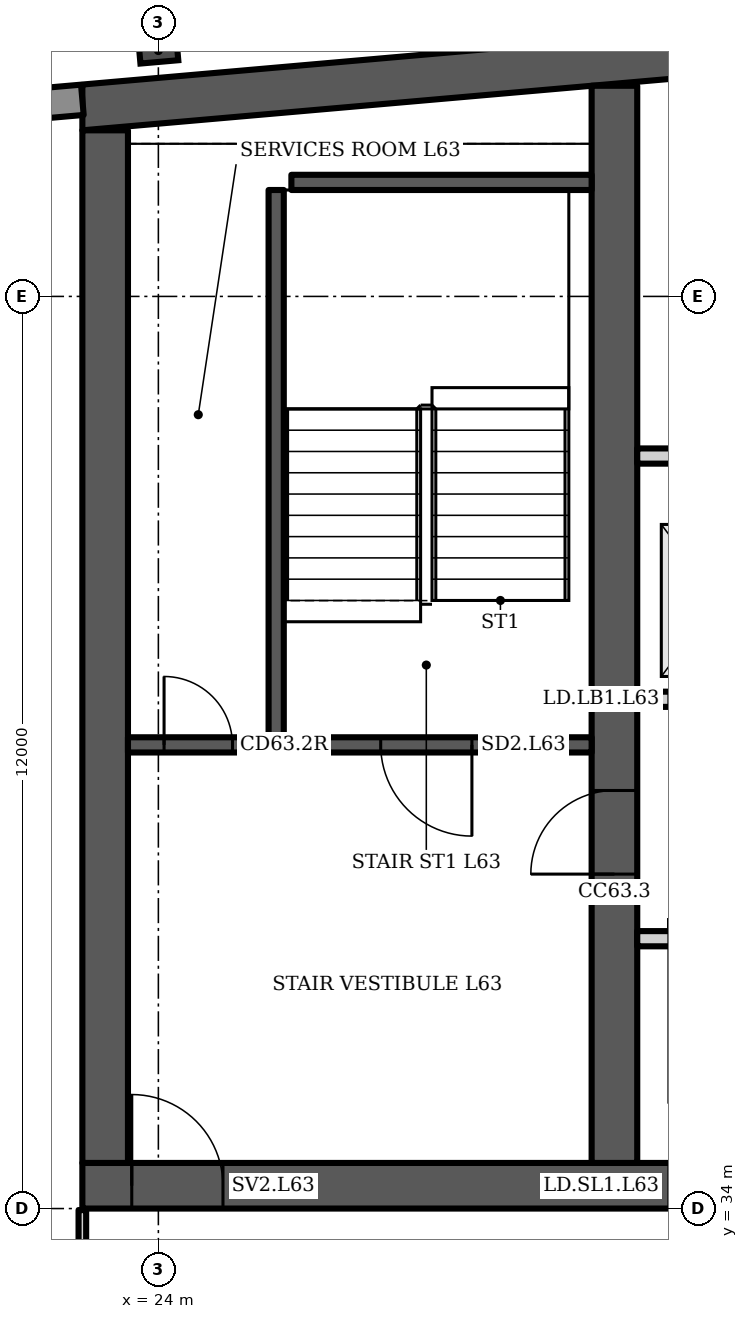
"""IFC4 building model, lengths in metres.
Left out: names, types, materials, properties, quantities, classifications, styles, units other than length and angle.
Written with IfcOpenShell. Run it as: python <this file> out.ifc"""

import sys

from ifc_helpers import new_model, si_unit, direction, frame, frame_2d, origin, origin_2d, place, context, subcontext, project, spatial, polyline, rectangle, i_section, outline, extrude, element, fill, save


model = new_model("IFC4")
c1 = context("Model", 3, precision=1e-05, world=origin(), true_north=direction((0.0, 1.0)))
c2 = subcontext(c1, "Body", "Model", "MODEL_VIEW")
j1 = project(units=[si_unit("LENGTHUNIT", "METRE"), si_unit("PLANEANGLEUNIT", "RADIAN")], contexts=[c1])
p1 = place(None, origin())
s1 = spatial("IfcSite", under=j1, at=p1, CompositionType="ELEMENT")
p2 = place(p1, origin())
s2 = spatial("IfcBuilding", under=s1, at=p2, CompositionType="ELEMENT")
p3 = place(p2, frame((0.0, 0.0, 250.3)))
s3 = spatial("IfcBuildingStorey", under=s2, at=p3, CompositionType="ELEMENT", Elevation=250.3)
p4 = place(p3, frame((0.0, 0.0, -0.0)))
e1 = element("IfcWall", 1, at=p4, inside=s3, PredefinedType="SHEAR", context=c2, shape_type="SweptSolid", body=[
    extrude(outline(polyline([(23.0, 48.185), (40.5, 49.716), (58.0, 48.185), (58.0, 48.787), (40.5, 50.318), (23.0, 48.787), (23.0, 48.185)])), origin(), (0.0, 0.0, 1.0), 3.6),
])
p5 = place(p3, frame((23.0, 34.3, 0.0), z_axis=(0.0, 0.0, 1.0), x_axis=(1.0, 0.0, 0.0)))
e2 = element("IfcWall", 2, at=p5, inside=s3, PredefinedType="SHEAR", context=c2, shape_type="SweptSolid", body=[
    extrude(rectangle(XDim=35.0, YDim=0.6, at=frame_2d((17.5, 0.0))), origin(), (0.0, 0.0, 1.0), 3.6),
])
p6 = place(p5, frame((0.65, 0.0, 0.0)))
e3 = element("IfcOpeningElement", 3, at=p6, cuts=e2, PredefinedType="OPENING", context=c2, shape_type="SweptSolid", body=[
    extrude(rectangle(XDim=1.2, YDim=2.1, at=frame_2d((0.6, 1.05))), frame((0.0, 0.31, 0.0), z_axis=(0.0, -1.0, 0.0), x_axis=(1.0, 0.0, 0.0)), (0.0, 0.0, 1.0), 0.62),
])
p7 = place(p5, frame((7.717, 0.0, 0.0)))
e4 = element("IfcOpeningElement", 4, at=p7, cuts=e2, PredefinedType="OPENING", context=c2, shape_type="SweptSolid", body=[
    extrude(rectangle(XDim=1.1, YDim=2.1, at=frame_2d((0.55, 1.05))), frame((0.0, 0.31, 0.0), z_axis=(0.0, -1.0, 0.0), x_axis=(1.0, 0.0, 0.0)), (0.0, 0.0, 1.0), 0.62),
])
p8 = place(p5, frame((12.183, 0.0, 0.0)))
e5 = element("IfcOpeningElement", 5, at=p8, cuts=e2, PredefinedType="OPENING", context=c2, shape_type="SweptSolid", body=[
    extrude(rectangle(XDim=1.1, YDim=2.1, at=frame_2d((0.55, 1.05))), frame((0.0, 0.31, 0.0), z_axis=(0.0, -1.0, 0.0), x_axis=(1.0, 0.0, 0.0)), (0.0, 0.0, 1.0), 0.62),
])
p9 = place(p5, frame((9.8, 0.0, 0.0)))
e6 = element("IfcOpeningElement", 6, at=p9, cuts=e2, PredefinedType="OPENING", context=c2, shape_type="SweptSolid", body=[
    extrude(rectangle(XDim=1.4, YDim=2.1, at=frame_2d((0.7, 1.05))), frame((0.0, 0.31, 0.0), z_axis=(0.0, -1.0, 0.0), x_axis=(1.0, 0.0, 0.0)), (0.0, 0.0, 1.0), 0.62),
])
p10 = place(p5, frame((14.717, 0.0, 0.0)))
e7 = element("IfcOpeningElement", 7, at=p10, cuts=e2, PredefinedType="OPENING", context=c2, shape_type="SweptSolid", body=[
    extrude(rectangle(XDim=1.1, YDim=2.1, at=frame_2d((0.55, 1.05))), frame((0.0, 0.31, 0.0), z_axis=(0.0, -1.0, 0.0), x_axis=(1.0, 0.0, 0.0)), (0.0, 0.0, 1.0), 0.62),
])
p11 = place(p5, frame((16.95, 0.0, 0.0)))
e8 = element("IfcOpeningElement", 8, at=p11, cuts=e2, PredefinedType="OPENING", context=c2, shape_type="SweptSolid", body=[
    extrude(rectangle(XDim=1.1, YDim=2.1, at=frame_2d((0.55, 1.05))), frame((0.0, 0.31, 0.0), z_axis=(0.0, -1.0, 0.0), x_axis=(1.0, 0.0, 0.0)), (0.0, 0.0, 1.0), 0.62),
])
p12 = place(p5, frame((19.183, 0.0, 0.0)))
e9 = element("IfcOpeningElement", 9, at=p12, cuts=e2, PredefinedType="OPENING", context=c2, shape_type="SweptSolid", body=[
    extrude(rectangle(XDim=1.1, YDim=2.1, at=frame_2d((0.55, 1.05))), frame((0.0, 0.31, 0.0), z_axis=(0.0, -1.0, 0.0), x_axis=(1.0, 0.0, 0.0)), (0.0, 0.0, 1.0), 0.62),
])
p13 = place(p5, frame((26.15, 0.0, 0.0)))
e10 = element("IfcOpeningElement", 10, at=p13, cuts=e2, PredefinedType="OPENING", context=c2, shape_type="SweptSolid", body=[
    extrude(rectangle(XDim=1.2, YDim=2.1, at=frame_2d((0.6, 1.05))), frame((0.0, 0.31, 0.0), z_axis=(0.0, -1.0, 0.0), x_axis=(1.0, 0.0, 0.0)), (0.0, 0.0, 1.0), 0.62),
])
p14 = place(p5, frame((28.767, 0.0, 0.0)))
e11 = element("IfcOpeningElement", 11, at=p14, cuts=e2, PredefinedType="OPENING", context=c2, shape_type="SweptSolid", body=[
    extrude(rectangle(XDim=1.0, YDim=2.1, at=frame_2d((0.5, 1.05))), frame((0.0, 0.31, 0.0), z_axis=(0.0, -1.0, 0.0), x_axis=(1.0, 0.0, 0.0)), (0.0, 0.0, 1.0), 0.62),
])
p15 = place(p5, frame((33.083, 0.0, 0.0)))
e12 = element("IfcOpeningElement", 12, at=p15, cuts=e2, PredefinedType="OPENING", context=c2, shape_type="SweptSolid", body=[
    extrude(rectangle(XDim=1.0, YDim=2.1, at=frame_2d((0.5, 1.05))), frame((0.0, 0.31, 0.0), z_axis=(0.0, -1.0, 0.0), x_axis=(1.0, 0.0, 0.0)), (0.0, 0.0, 1.0), 0.62),
])
p16 = place(p5, frame((30.8, 0.0, 0.0)))
e13 = element("IfcOpeningElement", 13, at=p16, cuts=e2, PredefinedType="OPENING", context=c2, shape_type="SweptSolid", body=[
    extrude(rectangle(XDim=1.4, YDim=2.1, at=frame_2d((0.7, 1.05))), frame((0.0, 0.31, 0.0), z_axis=(0.0, -1.0, 0.0), x_axis=(1.0, 0.0, 0.0)), (0.0, 0.0, 1.0), 0.62),
])
p17 = place(p3, frame((23.3, 34.6, 0.0), z_axis=(0.0, 0.0, 1.0), x_axis=(0.0, 1.0, 0.0)))
e14 = element("IfcWall", 14, at=p17, inside=s3, PredefinedType="SHEAR", context=c2, shape_type="SweptSolid", body=[
    extrude(rectangle(XDim=13.585, YDim=0.6, at=frame_2d((6.792, 0.0))), origin(), (0.0, 0.0, 1.0), 3.6),
])
p18 = place(p3, frame((30.0, 34.6, 0.0), z_axis=(0.0, 0.0, 1.0), x_axis=(0.0, 1.0, 0.0)))
e15 = element("IfcWall", 15, at=p18, inside=s3, PredefinedType="SHEAR", context=c2, shape_type="SweptSolid", body=[
    extrude(rectangle(XDim=14.171, YDim=0.6, at=frame_2d((7.085, 0.0))), origin(), (0.0, 0.0, 1.0), 3.6),
])
p19 = place(p18, frame((3.8, 0.0, 0.0)))
e16 = element("IfcOpeningElement", 16, at=p19, cuts=e15, PredefinedType="OPENING", context=c2, shape_type="SweptSolid", body=[
    extrude(rectangle(XDim=1.1, YDim=2.1, at=frame_2d((0.55, 1.05))), frame((0.0, 0.31, 0.0), z_axis=(0.0, -1.0, 0.0), x_axis=(1.0, 0.0, 0.0)), (0.0, 0.0, 1.0), 0.62),
])
p20 = place(p3, frame((24.0, 49.235, 0.0), z_axis=(0.0, 0.0, 1.0), x_axis=(-0.087156, 0.996197, 0.0)))
e17 = element("IfcColumn", 17, at=p20, inside=s3, PredefinedType="COLUMN", context=c2, shape_type="SweptSolid", body=[
    extrude(i_section(OverallWidth=0.3, OverallDepth=0.5, WebThickness=0.014, FlangeThickness=0.028, FilletRadius=0.027, at=origin_2d()), origin(), (0.0, 0.0, 1.0), 3.6),
])
p21 = place(p3, frame((23.0, 48.587, 0.0), z_axis=(0.0, 0.0, 1.0), x_axis=(-0.996194, -0.087168, 0.0)))
e18 = element("IfcWall", 18, at=p21, inside=s3, PredefinedType="SOLIDWALL", context=c2, shape_type="SweptSolid", body=[
    extrude(rectangle(XDim=2.994, YDim=0.4, at=frame_2d((1.497, 0.0))), origin(), (0.0, 0.0, 1.0), 3.2),
])
p22 = place(p3, frame((23.6, 40.1, 0.0), z_axis=(0.0, 0.0, 1.0), x_axis=(1.0, 0.0, 0.0)))
e19 = element("IfcWall", 19, at=p22, inside=s3, PredefinedType="SHEAR", context=c2, shape_type="SweptSolid", body=[
    extrude(rectangle(XDim=6.1, YDim=0.2, at=frame_2d((3.05, 0.0))), origin(), (0.0, 0.0, 1.0), 3.2),
])
p23 = place(p22, frame((3.325, 0.0, 0.0)))
e20 = element("IfcOpeningElement", 20, at=p23, cuts=e19, PredefinedType="OPENING", context=c2, shape_type="SweptSolid", body=[
    extrude(rectangle(XDim=1.2, YDim=2.1, at=frame_2d((0.6, 1.05))), frame((0.0, 0.11, 0.0), z_axis=(0.0, -1.0, 0.0), x_axis=(1.0, 0.0, 0.0)), (0.0, 0.0, 1.0), 0.22),
])
p24 = place(p22, frame((0.475, 0.0, 0.0)))
e21 = element("IfcOpeningElement", 21, at=p24, cuts=e19, PredefinedType="OPENING", context=c2, shape_type="SweptSolid", body=[
    extrude(rectangle(XDim=0.9, YDim=2.1, at=frame_2d((0.45, 1.05))), frame((0.0, 0.11, 0.0), z_axis=(0.0, -1.0, 0.0), x_axis=(1.0, 0.0, 0.0)), (0.0, 0.0, 1.0), 0.22),
])
p25 = place(p3, frame((25.55, 40.2, 0.0), z_axis=(0.0, 0.0, 1.0), x_axis=(0.0, 1.0, 0.0)))
e22 = element("IfcWall", 22, at=p25, inside=s3, PredefinedType="SHEAR", context=c2, shape_type="SweptSolid", body=[
    extrude(rectangle(XDim=7.2, YDim=0.2, at=frame_2d((3.6, 0.0))), origin(), (0.0, 0.0, 1.0), 3.2),
])
p26 = place(p3, frame((25.75, 47.5, 0.0), z_axis=(0.0, 0.0, 1.0), x_axis=(1.0, 0.0, 0.0)))
e23 = element("IfcWall", 23, at=p26, inside=s3, PredefinedType="SHEAR", context=c2, shape_type="SweptSolid", body=[
    extrude(rectangle(XDim=3.95, YDim=0.2, at=frame_2d((1.975, 0.0))), origin(), (0.0, 0.0, 1.0), 3.2),
])
p27 = place(p3, frame((30.3, 40.7, 0.0), z_axis=(0.0, 0.0, 1.0), x_axis=(1.0, 0.0, 0.0)))
e24 = element("IfcWall", 24, at=p27, inside=s3, PredefinedType="PARTITIONING", context=c2, shape_type="SweptSolid", body=[
    extrude(rectangle(XDim=6.4, YDim=0.2, at=frame_2d((3.2, 0.0))), origin(), (0.0, 0.0, 1.0), 3.2),
])
p28 = place(p27, frame((0.417, 0.0, 0.0)))
e25 = element("IfcOpeningElement", 25, at=p28, cuts=e24, PredefinedType="OPENING", context=c2, shape_type="SweptSolid", body=[
    extrude(rectangle(XDim=1.1, YDim=2.1, at=frame_2d((0.55, 1.05))), frame((0.0, 0.11, 0.0), z_axis=(0.0, -1.0, 0.0), x_axis=(1.0, 0.0, 0.0)), (0.0, 0.0, 1.0), 0.22),
])
p29 = place(p27, frame((2.65, 0.0, 0.0)))
e26 = element("IfcOpeningElement", 26, at=p29, cuts=e24, PredefinedType="OPENING", context=c2, shape_type="SweptSolid", body=[
    extrude(rectangle(XDim=1.1, YDim=2.1, at=frame_2d((0.55, 1.05))), frame((0.0, 0.11, 0.0), z_axis=(0.0, -1.0, 0.0), x_axis=(1.0, 0.0, 0.0)), (0.0, 0.0, 1.0), 0.22),
])
p30 = place(p27, frame((4.883, 0.0, 0.0)))
e27 = element("IfcOpeningElement", 27, at=p30, cuts=e24, PredefinedType="OPENING", context=c2, shape_type="SweptSolid", body=[
    extrude(rectangle(XDim=1.1, YDim=2.1, at=frame_2d((0.55, 1.05))), frame((0.0, 0.11, 0.0), z_axis=(0.0, -1.0, 0.0), x_axis=(1.0, 0.0, 0.0)), (0.0, 0.0, 1.0), 0.22),
])
p31 = place(p3, frame((0.0, 0.0, -0.0)))
e28 = element("IfcWall", 28, at=p31, inside=s3, PredefinedType="PARTITIONING", context=c2, shape_type="SweptSolid", body=[
    extrude(outline(polyline([(32.233, 37.45), (30.3, 37.45), (30.3, 37.65), (32.233, 37.65), (32.433, 37.65), (32.433, 34.6), (32.233, 34.6), (32.233, 37.45)])), origin(), (0.0, 0.0, 1.0), 3.2),
])
p32 = place(p3, frame((0.0, 0.0, -0.0)))
e29 = element("IfcWall", 29, at=p32, inside=s3, PredefinedType="PARTITIONING", context=c2, shape_type="SweptSolid", body=[
    extrude(outline(polyline([(32.433, 40.8), (32.233, 40.8), (32.233, 43.8), (30.3, 43.8), (30.3, 44.0), (36.7, 44.0), (36.7, 43.8), (34.767, 43.8), (34.767, 40.8), (34.567, 40.8), (34.567, 43.8), (32.433, 43.8), (32.433, 40.8)])), origin(), (0.0, 0.0, 1.0), 3.2),
])
p33 = place(p3, frame((23.0, 30.5, 0.0), z_axis=(0.0, 0.0, 1.0), x_axis=(0.0, 1.0, 0.0)))
e30 = element("IfcWall", 30, at=p33, inside=s3, PredefinedType="PARTITIONING", context=c2, shape_type="SweptSolid", body=[
    extrude(rectangle(XDim=3.48, YDim=0.1, at=frame_2d((1.74, 0.0))), origin(), (0.0, 0.0, 1.0), 3.2),
])
p34 = place(p23, origin())
e31 = element("IfcDoor", 31, at=p34, inside=s3, OperationType="SINGLE_SWING_RIGHT", PredefinedType="DOOR", context=c2, shape_type="SweptSolid", body=[
    extrude(rectangle(XDim=1.2, YDim=2.1, at=frame_2d((0.6, 1.05))), frame((0.0, 0.025, 0.0), z_axis=(0.0, -1.0, 0.0), x_axis=(1.0, 0.0, 0.0)), (0.0, 0.0, 1.0), 0.05),
])
fill(e20, e31)
p35 = place(p24, origin())
e32 = element("IfcDoor", 32, at=p35, inside=s3, OperationType="SINGLE_SWING_LEFT", PredefinedType="DOOR", context=c2, shape_type="SweptSolid", body=[
    extrude(rectangle(XDim=0.9, YDim=2.1, at=frame_2d((0.45, 1.05))), frame((0.0, 0.025, 0.0), z_axis=(0.0, -1.0, 0.0), x_axis=(1.0, 0.0, 0.0)), (0.0, 0.0, 1.0), 0.05),
])
fill(e21, e32)
p36 = place(p6, origin())
e33 = element("IfcDoor", 33, at=p36, inside=s3, OperationType="SINGLE_SWING_LEFT", PredefinedType="DOOR", context=c2, shape_type="SweptSolid", body=[
    extrude(rectangle(XDim=1.2, YDim=2.1, at=frame_2d((0.6, 1.05))), frame((0.0, 0.025, 0.0), z_axis=(0.0, -1.0, 0.0), x_axis=(1.0, 0.0, 0.0)), (0.0, 0.0, 1.0), 0.05),
])
fill(e3, e33)
p37 = place(p19, origin())
e34 = element("IfcDoor", 34, at=p37, inside=s3, OperationType="SINGLE_SWING_LEFT", PredefinedType="DOOR", context=c2, shape_type="SweptSolid", body=[
    extrude(rectangle(XDim=1.1, YDim=2.1, at=frame_2d((0.55, 1.05))), frame((0.0, 0.025, 0.0), z_axis=(0.0, -1.0, 0.0), x_axis=(1.0, 0.0, 0.0)), (0.0, 0.0, 1.0), 0.05),
])
fill(e16, e34)
save(model, sys.argv[1])
